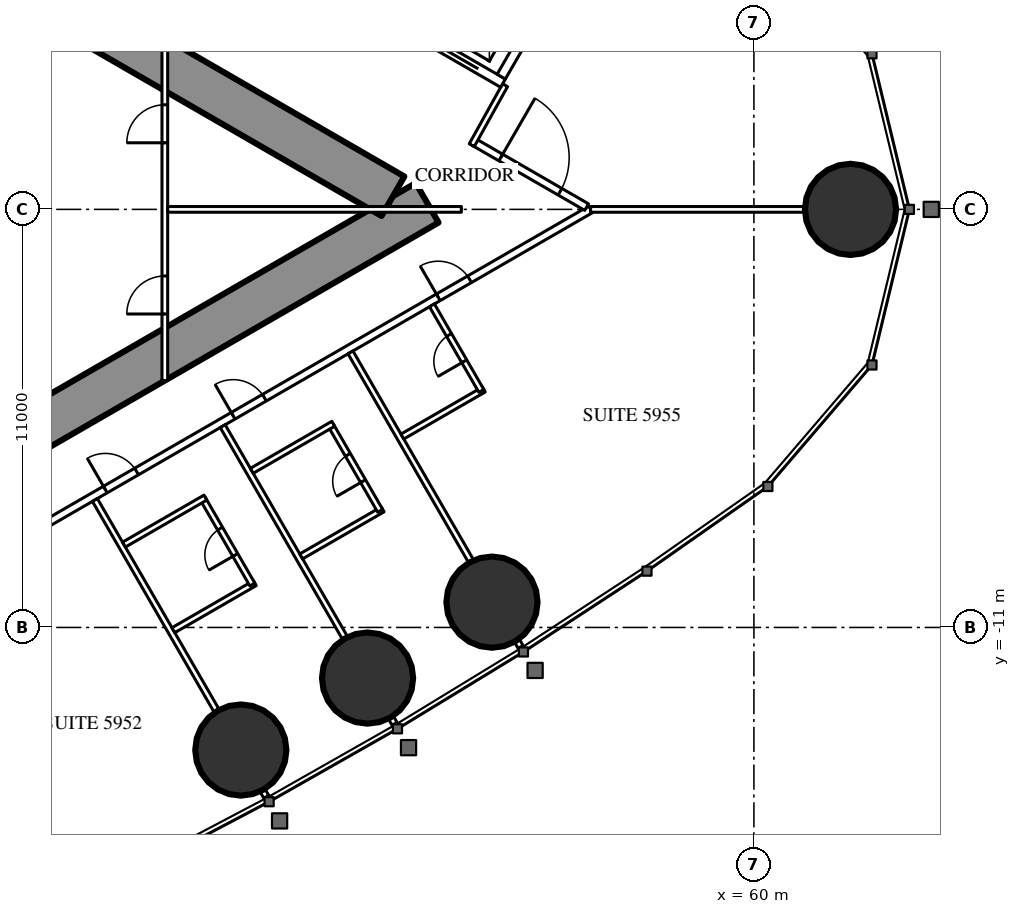
"""IFC4 building model, lengths in metres.
Left out: names, types, materials, properties, quantities, classifications, styles, units other than length and angle.
Written with IfcOpenShell. Run it as: python <this file> out.ifc"""

import sys

from ifc_helpers import new_model, si_unit, direction, frame, frame_2d, origin, origin_2d, place, context, subcontext, project, spatial, rectangle, circle, extrude, element, fill, save


model = new_model("IFC4")
c1 = context("Model", 3, precision=1e-05, world=origin(), true_north=direction((0.0, 1.0)))
c2 = subcontext(c1, "Body", "Model", "MODEL_VIEW")
j1 = project(units=[si_unit("LENGTHUNIT", "METRE"), si_unit("PLANEANGLEUNIT", "RADIAN")], contexts=[c1])
p1 = place(None, origin())
s1 = spatial("IfcSite", under=j1, at=p1, CompositionType="ELEMENT")
p2 = place(p1, origin())
s2 = spatial("IfcBuilding", under=s1, at=p2, CompositionType="ELEMENT")
p3 = place(p2, frame((0.0, 0.0, 222.5)))
s3 = spatial("IfcBuildingStorey", under=s2, at=p3, CompositionType="ELEMENT", Elevation=222.5)
for number, where, z_axis, x_axis in (
    (1, (62.542, 0.0, 0.0), (0.0, 0.0, 1.0), (1.0, 0.0, 0.0)),
    (2, (46.499, -14.226, 0.0), (0.0, 0.0, 1.0), (1.0, 0.0, 0.0)),
    (3, (49.834, -12.332, 0.0), (0.0, 0.0, 1.0), (1.0, 0.0, 0.0)),
    (4, (53.108, -10.334, 0.0), (0.0, 0.0, 1.0), (1.0, 0.0, 0.0)),
):
    element("IfcColumn", number, at=place(p3, frame(where, z_axis=z_axis, x_axis=x_axis)), inside=s3, PredefinedType="COLUMN", context=c2, shape_type="SweptSolid", body=[
        extrude(circle(Radius=1.2, at=origin_2d()), origin(), (0.0, 0.0, 1.0), 3.6),
    ])
p4 = place(p3, frame((27.2, -13.8, 0.0), z_axis=(0.0, 0.0, 1.0), x_axis=(0.866027159892, 0.499996958321, 0.0)))
e5 = element("IfcWall", 5, at=p4, inside=s3, PredefinedType="SHEAR", context=c2, shape_type="SweptSolid", body=[
    extrude(rectangle(XDim=27.947, YDim=1.2, at=frame_2d((13.973, 0.0))), origin(), (0.0, 0.0, 1.0), 3.6),
])
p5 = place(p4, frame((4.6, 0.0, 0.0)))
e6 = element("IfcOpeningElement", 6, at=p5, cuts=e5, PredefinedType="OPENING", context=c2, shape_type="SweptSolid", body=[
    extrude(rectangle(XDim=1.0, YDim=2.2, at=frame_2d((0.5, 1.1))), frame((0.0, 0.61, 0.0), z_axis=(0.0, -1.0, 0.0), x_axis=(1.0, 0.0, 0.0)), (0.0, 0.0, 1.0), 1.22),
])
p6 = place(p4, frame((13.395, 0.0, 0.0)))
e7 = element("IfcOpeningElement", 7, at=p6, cuts=e5, PredefinedType="OPENING", context=c2, shape_type="SweptSolid", body=[
    extrude(rectangle(XDim=1.8, YDim=2.2, at=frame_2d((0.9, 1.1))), frame((0.0, 0.61, 0.0), z_axis=(0.0, -1.0, 0.0), x_axis=(1.0, 0.0, 0.0)), (0.0, 0.0, 1.0), 1.22),
])
p7 = place(p3, frame((27.2, 13.8, 0.0), z_axis=(0.0, 0.0, 1.0), x_axis=(0.866024515034, -0.500001539357, 0.0)))
e8 = element("IfcWall", 8, at=p7, inside=s3, PredefinedType="SHEAR", context=c2, shape_type="SweptSolid", body=[
    extrude(rectangle(XDim=26.907, YDim=1.2, at=frame_2d((13.454, 0.0))), origin(), (0.0, 0.0, 1.0), 3.6),
])
p8 = place(p7, frame((4.6, 0.0, 0.0)))
e9 = element("IfcOpeningElement", 9, at=p8, cuts=e8, PredefinedType="OPENING", context=c2, shape_type="SweptSolid", body=[
    extrude(rectangle(XDim=1.0, YDim=2.2, at=frame_2d((0.5, 1.1))), frame((0.0, 0.61, 0.0), z_axis=(0.0, -1.0, 0.0), x_axis=(1.0, 0.0, 0.0)), (0.0, 0.0, 1.0), 1.22),
])
p9 = place(p7, frame((13.395, 0.0, 0.0)))
e10 = element("IfcOpeningElement", 10, at=p9, cuts=e8, PredefinedType="OPENING", context=c2, shape_type="SweptSolid", body=[
    extrude(rectangle(XDim=1.8, YDim=2.2, at=frame_2d((0.9, 1.1))), frame((0.0, 0.61, 0.0), z_axis=(0.0, -1.0, 0.0), x_axis=(1.0, 0.0, 0.0)), (0.0, 0.0, 1.0), 1.22),
])
p10 = place(p3, frame((28.959, -15.44, 0.0), z_axis=(0.0, 0.0, 1.0), x_axis=(0.866025227435, 0.500000305447, 0.0)))
e11 = element("IfcWall", 11, at=p10, inside=s3, PredefinedType="PARTITIONING", context=c2, shape_type="SweptSolid", body=[
    extrude(rectangle(XDim=30.88, YDim=0.2, at=frame_2d((15.44, 0.0))), origin(), (0.0, 0.0, 1.0), 3.35),
])
p11 = place(p10, frame((1.494, 0.0, 0.0)))
e12 = element("IfcOpeningElement", 12, at=p11, cuts=e11, PredefinedType="OPENING", context=c2, shape_type="SweptSolid", body=[
    extrude(rectangle(XDim=1.8, YDim=2.03, at=frame_2d((0.9, 1.015))), frame((0.0, 0.11, 0.0), z_axis=(0.0, -1.0, 0.0), x_axis=(1.0, 0.0, 0.0)), (0.0, 0.0, 1.0), 0.22),
])
p12 = place(p10, frame((7.687, 0.0, 0.0)))
e13 = element("IfcOpeningElement", 13, at=p12, cuts=e11, PredefinedType="OPENING", context=c2, shape_type="SweptSolid", body=[
    extrude(rectangle(XDim=1.0, YDim=2.2, at=frame_2d((0.5, 1.1))), frame((0.0, 0.11, 0.0), z_axis=(0.0, -1.0, 0.0), x_axis=(1.0, 0.0, 0.0)), (0.0, 0.0, 1.0), 0.22),
])
p13 = place(p10, frame((16.137, 0.0, 0.0)))
e14 = element("IfcOpeningElement", 14, at=p13, cuts=e11, PredefinedType="OPENING", context=c2, shape_type="SweptSolid", body=[
    extrude(rectangle(XDim=0.95, YDim=2.2, at=frame_2d((0.475, 1.1))), frame((0.0, 0.11, 0.0), z_axis=(0.0, -1.0, 0.0), x_axis=(1.0, 0.0, 0.0)), (0.0, 0.0, 1.0), 0.22),
])
p14 = place(p10, frame((20.021, 0.0, 0.0)))
e15 = element("IfcOpeningElement", 15, at=p14, cuts=e11, PredefinedType="OPENING", context=c2, shape_type="SweptSolid", body=[
    extrude(rectangle(XDim=0.95, YDim=2.2, at=frame_2d((0.475, 1.1))), frame((0.0, 0.11, 0.0), z_axis=(0.0, -1.0, 0.0), x_axis=(1.0, 0.0, 0.0)), (0.0, 0.0, 1.0), 0.22),
])
p15 = place(p10, frame((26.253, 0.0, 0.0)))
e16 = element("IfcOpeningElement", 16, at=p15, cuts=e11, PredefinedType="OPENING", context=c2, shape_type="SweptSolid", body=[
    extrude(rectangle(XDim=0.95, YDim=2.2, at=frame_2d((0.475, 1.1))), frame((0.0, 0.11, 0.0), z_axis=(0.0, -1.0, 0.0), x_axis=(1.0, 0.0, 0.0)), (0.0, 0.0, 1.0), 0.22),
])
p16 = place(p3, frame((42.66, -7.646, 0.0), z_axis=(0.0, 0.0, 1.0), x_axis=(0.499996592859, -0.866027370889, 0.0)))
e17 = element("IfcWall", 17, at=p16, inside=s3, PredefinedType="PARTITIONING", context=c2, shape_type="SweptSolid", body=[
    extrude(rectangle(XDim=6.398, YDim=0.15, at=frame_2d((3.199, 0.0))), origin(), (0.0, 0.0, 1.0), 2.45),
])
p17 = place(p3, frame((47.079, -15.3, 0.0), z_axis=(0.0, 0.0, 1.0), x_axis=(0.499212083968, -0.866479829667, 0.0)))
e18 = element("IfcWall", 18, at=p17, inside=s3, PredefinedType="PARTITIONING", context=c2, shape_type="SweptSolid", body=[
    extrude(rectangle(XDim=0.179, YDim=0.15, at=frame_2d((0.09, 0.0))), origin(), (0.0, 0.0, 1.0), 2.45),
])
p18 = place(p3, frame((46.023, -5.704, 0.0), z_axis=(0.0, 0.0, 1.0), x_axis=(0.499984478165, -0.866034365135, 0.0)))
e19 = element("IfcWall", 19, at=p18, inside=s3, PredefinedType="PARTITIONING", context=c2, shape_type="SweptSolid", body=[
    extrude(rectangle(XDim=6.426, YDim=0.15, at=frame_2d((3.213, 0.0))), origin(), (0.0, 0.0, 1.0), 2.45),
])
p19 = place(p3, frame((50.456, -13.382, 0.0), z_axis=(0.0, 0.0, 1.0), x_axis=(0.500661834965, -0.865642955848, 0.0)))
e20 = element("IfcWall", 20, at=p19, inside=s3, PredefinedType="PARTITIONING", context=c2, shape_type="SweptSolid", body=[
    extrude(rectangle(XDim=0.18, YDim=0.15, at=frame_2d((0.09, 0.0))), origin(), (0.0, 0.0, 1.0), 2.45),
])
p20 = place(p3, frame((49.385, -3.763, 0.0), z_axis=(0.0, 0.0, 1.0), x_axis=(0.499999447814, -0.866025722589, 0.0)))
e21 = element("IfcWall", 21, at=p20, inside=s3, PredefinedType="PARTITIONING", context=c2, shape_type="SweptSolid", body=[
    extrude(rectangle(XDim=6.333, YDim=0.15, at=frame_2d((3.166, 0.0))), origin(), (0.0, 0.0, 1.0), 2.45),
])
p21 = place(p3, frame((53.771, -11.36, 0.0), z_axis=(0.0, 0.0, 1.0), x_axis=(0.499524978789, -0.866299483762, 0.0)))
e22 = element("IfcWall", 22, at=p21, inside=s3, PredefinedType="PARTITIONING", context=c2, shape_type="SweptSolid", body=[
    extrude(rectangle(XDim=0.178, YDim=0.15, at=frame_2d((0.089, 0.0))), origin(), (0.0, 0.0, 1.0), 2.45),
])
p22 = place(p3, frame((55.702, 0.0, 0.0), z_axis=(0.0, 0.0, 1.0), x_axis=(1.0, 0.0, 0.0)))
e23 = element("IfcWall", 23, at=p22, inside=s3, PredefinedType="PARTITIONING", context=c2, shape_type="SweptSolid", body=[
    extrude(rectangle(XDim=5.619, YDim=0.15, at=frame_2d((2.81, 0.0))), origin(), (0.0, 0.0, 1.0), 2.45),
])
p23 = place(p3, frame((52.639, 1.769, 0.0), z_axis=(0.0, 0.0, 1.0), x_axis=(0.866027340901, -0.4999966448, 0.0)))
e24 = element("IfcWall", 24, at=p23, inside=s3, PredefinedType="PARTITIONING", context=c2, shape_type="SweptSolid", body=[
    extrude(rectangle(XDim=3.417, YDim=0.2, at=frame_2d((1.708, 0.0))), origin(), (0.0, 0.0, 1.0), 3.35),
])
p24 = place(p23, frame((0.809, 0.0, 0.0)))
e25 = element("IfcOpeningElement", 25, at=p24, cuts=e24, PredefinedType="OPENING", context=c2, shape_type="SweptSolid", body=[
    extrude(rectangle(XDim=1.8, YDim=2.2, at=frame_2d((0.9, 1.1))), frame((0.0, 0.11, 0.0), z_axis=(0.0, -1.0, 0.0), x_axis=(1.0, 0.0, 0.0)), (0.0, 0.0, 1.0), 0.22),
])
p25 = place(p3, frame((52.576, 1.689, 0.0), z_axis=(0.0, 0.0, 1.0), x_axis=(0.485424724123, 0.874278466629, 0.0)))
e26 = element("IfcWall", 26, at=p25, inside=s3, PredefinedType="PARTITIONING", context=c2, shape_type="SweptSolid", body=[
    extrude(rectangle(XDim=1.805, YDim=0.15, at=frame_2d((0.903, 0.0))), origin(), (0.0, 0.0, 1.0), 3.35),
])
p26 = place(p3, frame((44.725, -11.072, 0.0), z_axis=(0.0, 0.0, 1.0), x_axis=(0.866006523861, 0.500032699561, 0.0)))
e27 = element("IfcWall", 27, at=p26, inside=s3, PredefinedType="PARTITIONING", context=c2, shape_type="SweptSolid", body=[
    extrude(rectangle(XDim=2.475, YDim=0.15, at=frame_2d((1.237, 0.0))), origin(), (0.0, 0.0, 1.0), 3.35),
])
p27 = place(p3, frame((45.503, -7.621, 0.0), z_axis=(0.0, 0.0, 1.0), x_axis=(0.500006934395, -0.866021400173, 0.0)))
e28 = element("IfcWall", 28, at=p27, inside=s3, PredefinedType="PARTITIONING", context=c2, shape_type="SweptSolid", body=[
    extrude(rectangle(XDim=2.6, YDim=0.15, at=frame_2d((1.3, 0.0))), origin(), (0.0, 0.0, 1.0), 3.35),
])
p28 = place(p27, frame((0.9, 0.0, 0.0)))
e29 = element("IfcOpeningElement", 29, at=p28, cuts=e28, PredefinedType="OPENING", context=c2, shape_type="SweptSolid", body=[
    extrude(rectangle(XDim=0.8, YDim=2.2, at=frame_2d((0.4, 1.1))), frame((0.0, 0.085, 0.0), z_axis=(0.0, -1.0, 0.0), x_axis=(1.0, 0.0, 0.0)), (0.0, 0.0, 1.0), 0.17),
])
for number, where, z_axis, x_axis in (
    (30, (43.425, -8.821, 0.0), (0.0, 0.0, 1.0), (0.866, 0.5, 0.0)),
    (31, (48.088, -9.13, 0.0), (0.0, 0.0, 1.0), (0.866, 0.5, 0.0)),
):
    element("IfcWall", number, at=place(p3, frame(where, z_axis=z_axis, x_axis=x_axis)), inside=s3, PredefinedType="PARTITIONING", context=c2, shape_type="SweptSolid", body=[
        extrude(rectangle(XDim=2.475, YDim=0.15, at=frame_2d((1.237, 0.0))), origin(), (0.0, 0.0, 1.0), 3.35),
    ])
p29 = place(p3, frame((48.866, -5.679, 0.0), z_axis=(0.0, 0.0, 1.0), x_axis=(0.500006934395, -0.866021400173, 0.0)))
e32 = element("IfcWall", 32, at=p29, inside=s3, PredefinedType="PARTITIONING", context=c2, shape_type="SweptSolid", body=[
    extrude(rectangle(XDim=2.6, YDim=0.15, at=frame_2d((1.3, 0.0))), origin(), (0.0, 0.0, 1.0), 3.35),
])
p30 = place(p29, frame((0.9, 0.0, 0.0)))
e33 = element("IfcOpeningElement", 33, at=p30, cuts=e32, PredefinedType="OPENING", context=c2, shape_type="SweptSolid", body=[
    extrude(rectangle(XDim=0.8, YDim=2.2, at=frame_2d((0.4, 1.1))), frame((0.0, 0.085, 0.0), z_axis=(0.0, -1.0, 0.0), x_axis=(1.0, 0.0, 0.0)), (0.0, 0.0, 1.0), 0.17),
])
p31 = place(p3, frame((46.788, -6.879, 0.0), z_axis=(0.0, 0.0, 1.0), x_axis=(0.866006523861, 0.500032699561, 0.0)))
e34 = element("IfcWall", 34, at=p31, inside=s3, PredefinedType="PARTITIONING", context=c2, shape_type="SweptSolid", body=[
    extrude(rectangle(XDim=2.475, YDim=0.15, at=frame_2d((1.237, 0.0))), origin(), (0.0, 0.0, 1.0), 3.35),
])
p32 = place(p3, frame((50.75, -5.977, 0.0), z_axis=(0.0, 0.0, 1.0), x_axis=(0.866031185235, 0.4999899861, 0.0)))
e35 = element("IfcWall", 35, at=p32, inside=s3, PredefinedType="PARTITIONING", context=c2, shape_type="SweptSolid", body=[
    extrude(rectangle(XDim=2.475, YDim=0.15, at=frame_2d((1.238, 0.0))), origin(), (0.0, 0.0, 1.0), 3.35),
])
p33 = place(p3, frame((51.529, -2.525, 0.0), z_axis=(0.0, 0.0, 1.0), x_axis=(0.500006934395, -0.866021400173, 0.0)))
e36 = element("IfcWall", 36, at=p33, inside=s3, PredefinedType="PARTITIONING", context=c2, shape_type="SweptSolid", body=[
    extrude(rectangle(XDim=2.6, YDim=0.15, at=frame_2d((1.3, 0.0))), origin(), (0.0, 0.0, 1.0), 3.35),
])
p34 = place(p33, frame((0.9, 0.0, 0.0)))
e37 = element("IfcOpeningElement", 37, at=p34, cuts=e36, PredefinedType="OPENING", context=c2, shape_type="SweptSolid", body=[
    extrude(rectangle(XDim=0.8, YDim=2.2, at=frame_2d((0.4, 1.1))), frame((0.0, 0.085, 0.0), z_axis=(0.0, -1.0, 0.0), x_axis=(1.0, 0.0, 0.0)), (0.0, 0.0, 1.0), 0.17),
])
p35 = place(p3, frame((44.5, -4.505, 0.0), z_axis=(0.0, 0.0, 1.0), x_axis=(0.0, 1.0, 0.0)))
e38 = element("IfcWall", 38, at=p35, inside=s3, PredefinedType="PARTITIONING", context=c2, shape_type="SweptSolid", body=[
    extrude(rectangle(XDim=9.009, YDim=0.15, at=frame_2d((4.505, 0.0))), origin(), (0.0, 0.0, 1.0), 3.35),
])
p36 = place(p35, frame((1.752, 0.0, 0.0)))
e39 = element("IfcOpeningElement", 39, at=p36, cuts=e38, PredefinedType="OPENING", context=c2, shape_type="SweptSolid", body=[
    extrude(rectangle(XDim=1.0, YDim=2.2, at=frame_2d((0.5, 1.1))), frame((0.0, 0.085, 0.0), z_axis=(0.0, -1.0, 0.0), x_axis=(1.0, 0.0, 0.0)), (0.0, 0.0, 1.0), 0.17),
])
p37 = place(p35, frame((6.257, 0.0, 0.0)))
e40 = element("IfcOpeningElement", 40, at=p37, cuts=e38, PredefinedType="OPENING", context=c2, shape_type="SweptSolid", body=[
    extrude(rectangle(XDim=1.0, YDim=2.2, at=frame_2d((0.5, 1.1))), frame((0.0, 0.085, 0.0), z_axis=(0.0, -1.0, 0.0), x_axis=(1.0, 0.0, 0.0)), (0.0, 0.0, 1.0), 0.17),
])
p38 = place(p3, frame((44.575, 0.0, 0.0), z_axis=(0.0, 0.0, 1.0), x_axis=(1.0, 0.0, 0.0)))
e41 = element("IfcWall", 41, at=p38, inside=s3, PredefinedType="PARTITIONING", context=c2, shape_type="SweptSolid", body=[
    extrude(rectangle(XDim=7.727, YDim=0.15, at=frame_2d((3.864, 0.0))), origin(), (0.0, 0.0, 1.0), 2.45),
])
p39 = place(p3, frame((47.681, 6.622, 0.0), z_axis=(0.0, 0.0, 1.0), x_axis=(0.86603344179, -0.499986077507, 0.0)))
e42 = element("IfcWall", 42, at=p39, inside=s3, PredefinedType="PARTITIONING", context=c2, shape_type="SweptSolid", body=[
    extrude(rectangle(XDim=6.6, YDim=0.25, at=frame_2d((3.3, 0.0))), origin(), (0.0, 0.0, 1.0), 3.35),
])
p40 = place(p39, frame((0.75, 0.0, 0.0)))
e43 = element("IfcOpeningElement", 43, at=p40, cuts=e42, PredefinedType="OPENING", context=c2, shape_type="SweptSolid", body=[
    extrude(rectangle(XDim=1.1, YDim=2.2, at=frame_2d((0.55, 1.1))), frame((0.0, 0.135, 0.0), z_axis=(0.0, -1.0, 0.0), x_axis=(1.0, 0.0, 0.0)), (0.0, 0.0, 1.0), 0.27),
])
p41 = place(p39, frame((2.75, 0.0, 0.0)))
e44 = element("IfcOpeningElement", 44, at=p41, cuts=e42, PredefinedType="OPENING", context=c2, shape_type="SweptSolid", body=[
    extrude(rectangle(XDim=1.1, YDim=2.2, at=frame_2d((0.55, 1.1))), frame((0.0, 0.135, 0.0), z_axis=(0.0, -1.0, 0.0), x_axis=(1.0, 0.0, 0.0)), (0.0, 0.0, 1.0), 0.27),
])
p42 = place(p39, frame((4.75, 0.0, 0.0)))
e45 = element("IfcOpeningElement", 45, at=p42, cuts=e42, PredefinedType="OPENING", context=c2, shape_type="SweptSolid", body=[
    extrude(rectangle(XDim=1.1, YDim=2.2, at=frame_2d((0.55, 1.1))), frame((0.0, 0.135, 0.0), z_axis=(0.0, -1.0, 0.0), x_axis=(1.0, 0.0, 0.0)), (0.0, 0.0, 1.0), 0.27),
])
p43 = place(p3, frame((53.352, 3.493, 0.0), z_axis=(0.0, 0.0, 1.0), x_axis=(0.499872130319, 0.866099216793, 0.0)))
e46 = element("IfcWall", 46, at=p43, inside=s3, PredefinedType="PARTITIONING", context=c2, shape_type="SweptSolid", body=[
    extrude(rectangle(XDim=3.2, YDim=0.25, at=frame_2d((1.6, 0.0))), origin(), (0.0, 0.0, 1.0), 3.35),
])
p44 = place(p28, origin())
e47 = element("IfcDoor", 47, at=p44, inside=s3, OperationType="SINGLE_SWING_RIGHT", PredefinedType="DOOR", context=c2, shape_type="SweptSolid", body=[
    extrude(rectangle(XDim=0.8, YDim=2.2, at=frame_2d((0.4, 1.1))), frame((0.0, 0.025, 0.0), z_axis=(0.0, -1.0, 0.0), x_axis=(1.0, 0.0, 0.0)), (0.0, 0.0, 1.0), 0.05),
])
fill(e29, e47)
p45 = place(p13, origin())
e48 = element("IfcDoor", 48, at=p45, inside=s3, OperationType="SINGLE_SWING_LEFT", PredefinedType="DOOR", context=c2, shape_type="SweptSolid", body=[
    extrude(rectangle(XDim=0.95, YDim=2.2, at=frame_2d((0.475, 1.1))), frame((0.0, 0.025, 0.0), z_axis=(0.0, -1.0, 0.0), x_axis=(1.0, 0.0, 0.0)), (0.0, 0.0, 1.0), 0.05),
])
fill(e14, e48)
p46 = place(p30, origin())
e49 = element("IfcDoor", 49, at=p46, inside=s3, OperationType="SINGLE_SWING_RIGHT", PredefinedType="DOOR", context=c2, shape_type="SweptSolid", body=[
    extrude(rectangle(XDim=0.8, YDim=2.2, at=frame_2d((0.4, 1.1))), frame((0.0, 0.025, 0.0), z_axis=(0.0, -1.0, 0.0), x_axis=(1.0, 0.0, 0.0)), (0.0, 0.0, 1.0), 0.05),
])
fill(e33, e49)
p47 = place(p14, origin())
e50 = element("IfcDoor", 50, at=p47, inside=s3, OperationType="SINGLE_SWING_LEFT", PredefinedType="DOOR", context=c2, shape_type="SweptSolid", body=[
    extrude(rectangle(XDim=0.95, YDim=2.2, at=frame_2d((0.475, 1.1))), frame((0.0, 0.025, 0.0), z_axis=(0.0, -1.0, 0.0), x_axis=(1.0, 0.0, 0.0)), (0.0, 0.0, 1.0), 0.05),
])
fill(e15, e50)
p48 = place(p34, origin())
e51 = element("IfcDoor", 51, at=p48, inside=s3, OperationType="SINGLE_SWING_RIGHT", PredefinedType="DOOR", context=c2, shape_type="SweptSolid", body=[
    extrude(rectangle(XDim=0.8, YDim=2.2, at=frame_2d((0.4, 1.1))), frame((0.0, 0.025, 0.0), z_axis=(0.0, -1.0, 0.0), x_axis=(1.0, 0.0, 0.0)), (0.0, 0.0, 1.0), 0.05),
])
fill(e37, e51)
p49 = place(p15, origin())
e52 = element("IfcDoor", 52, at=p49, inside=s3, OperationType="SINGLE_SWING_LEFT", PredefinedType="DOOR", context=c2, shape_type="SweptSolid", body=[
    extrude(rectangle(XDim=0.95, YDim=2.2, at=frame_2d((0.475, 1.1))), frame((0.0, 0.025, 0.0), z_axis=(0.0, -1.0, 0.0), x_axis=(1.0, 0.0, 0.0)), (0.0, 0.0, 1.0), 0.05),
])
fill(e16, e52)
p50 = place(p24, origin())
e53 = element("IfcDoor", 53, at=p50, inside=s3, OperationType="DOUBLE_DOOR_SINGLE_SWING", PredefinedType="DOOR", context=c2, shape_type="SweptSolid", body=[
    extrude(rectangle(XDim=1.8, YDim=2.2, at=frame_2d((0.9, 1.1))), frame((0.0, 0.025, 0.0), z_axis=(0.0, -1.0, 0.0), x_axis=(1.0, 0.0, 0.0)), (0.0, 0.0, 1.0), 0.05),
])
fill(e25, e53)
p51 = place(p36, origin())
e54 = element("IfcDoor", 54, at=p51, inside=s3, OperationType="SINGLE_SWING_LEFT", PredefinedType="DOOR", context=c2, shape_type="SweptSolid", body=[
    extrude(rectangle(XDim=1.0, YDim=2.2, at=frame_2d((0.5, 1.1))), frame((0.0, 0.025, 0.0), z_axis=(0.0, -1.0, 0.0), x_axis=(1.0, 0.0, 0.0)), (0.0, 0.0, 1.0), 0.05),
])
fill(e39, e54)
p52 = place(p37, origin())
e55 = element("IfcDoor", 55, at=p52, inside=s3, OperationType="SINGLE_SWING_LEFT", PredefinedType="DOOR", context=c2, shape_type="SweptSolid", body=[
    extrude(rectangle(XDim=1.0, YDim=2.2, at=frame_2d((0.5, 1.1))), frame((0.0, 0.025, 0.0), z_axis=(0.0, -1.0, 0.0), x_axis=(1.0, 0.0, 0.0)), (0.0, 0.0, 1.0), 0.05),
])
fill(e40, e55)
p53 = place(p42, origin())
e56 = element("IfcDoor", 56, at=p53, inside=s3, OperationType="DOUBLE_DOOR_SLIDING", PredefinedType="USERDEFINED", context=c2, shape_type="SweptSolid", body=[
    extrude(rectangle(XDim=1.1, YDim=2.2, at=frame_2d((0.55, 1.1))), frame((0.0, 0.025, 0.0), z_axis=(0.0, -1.0, 0.0), x_axis=(1.0, 0.0, 0.0)), (0.0, 0.0, 1.0), 0.05),
])
fill(e45, e56)
save(model, sys.argv[1])
